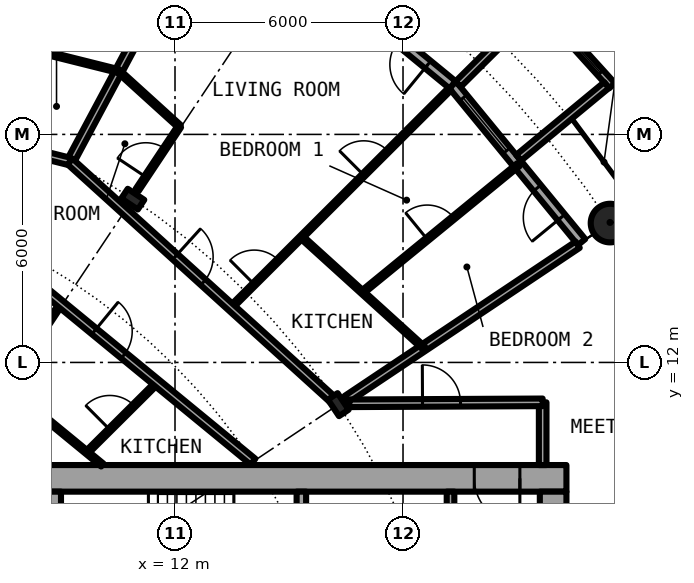
"""IFC4 building model, lengths in metres.
Left out: names, types, materials, properties, quantities, classifications, styles, units other than length and angle.
Written with IfcOpenShell. Run it as: python <this file> out.ifc"""

import sys

from ifc_helpers import new_model, si_unit, direction, frame, frame_2d, origin, origin_2d, place, context, subcontext, project, spatial, rectangle, circle, hollow_circle, i_section, extrude, element, fill, save


model = new_model("IFC4")
c1 = context("Model", 3, precision=1e-05, world=origin(), true_north=direction((0.0, 1.0)))
c2 = subcontext(c1, "Body", "Model", "MODEL_VIEW")
j1 = project(units=[si_unit("LENGTHUNIT", "METRE"), si_unit("PLANEANGLEUNIT", "RADIAN")], contexts=[c1])
p1 = place(None, origin())
s1 = spatial("IfcSite", under=j1, at=p1, CompositionType="ELEMENT")
p2 = place(p1, origin())
s2 = spatial("IfcBuilding", under=s1, at=p2, CompositionType="ELEMENT")
p3 = place(p2, frame((0.0, 0.0, 81.9)))
s3 = spatial("IfcBuildingStorey", under=s2, at=p3, CompositionType="ELEMENT", Elevation=81.9)
p4 = place(p3, frame((23.448, 15.667, 0.0), z_axis=(0.0, 0.0, 1.0), x_axis=(1.0, 0.0, 0.0)))
e1 = element("IfcColumn", 1, at=p4, inside=s3, PredefinedType="COLUMN", context=c2, shape_type="SweptSolid", body=[
    extrude(hollow_circle(Radius=0.508, WallThickness=0.04, at=origin_2d()), origin(), (0.0, 0.0, 1.0), 3.05),
])
for number, where, z_axis, x_axis in (
    (2, (16.297, 10.889, 0.0), (0.0, 0.0, 1.0), (0.831, 0.556, 0.0)),
    (3, (10.889, 16.297, 0.0), (0.0, 0.0, 1.0), (0.556, 0.831, 0.0)),
):
    element("IfcColumn", number, at=place(p3, frame(where, z_axis=z_axis, x_axis=x_axis)), inside=s3, PredefinedType="COLUMN", context=c2, shape_type="SweptSolid", body=[
        extrude(i_section(OverallWidth=0.306, OverallDepth=0.524, WebThickness=0.021, FlangeThickness=0.04, FilletRadius=0.027, at=origin_2d()), origin(), (0.0, 0.0, 1.0), 3.05),
    ])
p5 = place(p3, frame((22.699, 15.167, 0.0), z_axis=(0.0, 0.0, 1.0), x_axis=(-0.634382322723, 0.773019449054, 0.0)))
e4 = element("IfcWall", 4, at=p5, inside=s3, PredefinedType="SOLIDWALL", context=c2, shape_type="SweptSolid", body=[
    extrude(rectangle(XDim=5.352, YDim=0.25, at=frame_2d((2.676, 0.0))), origin(), (0.0, 0.0, 1.0), 2.7),
])
p6 = place(p5, frame((0.841, 0.0, 0.0)))
e5 = element("IfcOpeningElement", 5, at=p6, cuts=e4, PredefinedType="OPENING", context=c2, shape_type="SweptSolid", body=[
    extrude(rectangle(XDim=1.0, YDim=2.2, at=frame_2d((0.5, 1.1))), frame((0.0, 0.135, 0.0), z_axis=(0.0, -1.0, 0.0), x_axis=(1.0, 0.0, 0.0)), (0.0, 0.0, 1.0), 0.27),
])
p7 = place(p5, frame((3.111, 0.0, 0.3)))
e6 = element("IfcOpeningElement", 6, at=p7, cuts=e4, PredefinedType="OPENING", context=c2, shape_type="SweptSolid", body=[
    extrude(rectangle(XDim=1.8, YDim=2.1, at=frame_2d((0.9, 1.05))), frame((0.0, 0.135, 0.0), z_axis=(0.0, -1.0, 0.0), x_axis=(1.0, 0.0, 0.0)), (0.0, 0.0, 1.0), 0.27),
])
p8 = place(p3, frame((23.503, 19.282, -0.03), z_axis=(0.0, 0.0, 1.0), x_axis=(-0.671506829416, 0.740998365753, 0.0)))
e7 = element("IfcWall", 7, at=p8, inside=s3, PredefinedType="SOLIDWALL", context=c2, shape_type="SweptSolid", body=[
    extrude(rectangle(XDim=2.993, YDim=0.2, at=frame_2d((1.497, 0.0))), origin(), (0.0, 0.0, 1.0), 2.73),
])
p9 = place(p8, frame((0.457, 0.0, 0.33)))
e8 = element("IfcOpeningElement", 8, at=p9, cuts=e7, PredefinedType="OPENING", context=c2, shape_type="SweptSolid", body=[
    extrude(circle(Radius=1.04, at=frame_2d((1.04, 1.04))), frame((0.0, 0.11, 0.0), z_axis=(0.0, -1.0, 0.0), x_axis=(1.0, 0.0, 0.0)), (0.0, 0.0, 1.0), 0.22),
])
p10 = place(p3, frame((21.041, 17.384, -0.03), z_axis=(0.0, 0.0, 1.0), x_axis=(0.770784861449, 0.63709551667, 0.0)))
e9 = element("IfcWall", 9, at=p10, inside=s3, PredefinedType="SOLIDWALL", context=c2, shape_type="SweptSolid", body=[
    extrude(rectangle(XDim=3.006, YDim=0.2, at=frame_2d((1.503, 0.0))), origin(), (0.0, 0.0, 1.0), 2.73),
])
p11 = place(p3, frame((19.45, 19.323, -0.03), z_axis=(0.0, 0.0, 1.0), x_axis=(0.709727076896, 0.704476739375, 0.0)))
e10 = element("IfcWall", 10, at=p11, inside=s3, PredefinedType="SOLIDWALL", context=c2, shape_type="SweptSolid", body=[
    extrude(rectangle(XDim=2.883, YDim=0.2, at=frame_2d((1.441, 0.0))), origin(), (0.0, 0.0, 1.0), 2.73),
])
p12 = place(p3, frame((19.304, 19.304, 0.0), z_axis=(0.0, 0.0, 1.0), x_axis=(-0.773019449054, 0.634382322723, 0.0)))
e11 = element("IfcWall", 11, at=p12, inside=s3, PredefinedType="SOLIDWALL", context=c2, shape_type="SweptSolid", body=[
    extrude(rectangle(XDim=5.352, YDim=0.25, at=frame_2d((2.676, 0.0))), origin(), (0.0, 0.0, 1.0), 2.7),
])
p13 = place(p12, frame((0.841, 0.0, 0.0)))
e12 = element("IfcOpeningElement", 12, at=p13, cuts=e11, PredefinedType="OPENING", context=c2, shape_type="SweptSolid", body=[
    extrude(rectangle(XDim=1.0, YDim=2.2, at=frame_2d((0.5, 1.1))), frame((0.0, 0.135, 0.0), z_axis=(0.0, -1.0, 0.0), x_axis=(1.0, 0.0, 0.0)), (0.0, 0.0, 1.0), 0.27),
])
p14 = place(p12, frame((3.111, 0.0, 0.3)))
e13 = element("IfcOpeningElement", 13, at=p14, cuts=e11, PredefinedType="OPENING", context=c2, shape_type="SweptSolid", body=[
    extrude(rectangle(XDim=1.8, YDim=2.1, at=frame_2d((0.9, 1.05))), frame((0.0, 0.135, 0.0), z_axis=(0.0, -1.0, 0.0), x_axis=(1.0, 0.0, 0.0)), (0.0, 0.0, 1.0), 0.27),
])
p15 = place(p3, frame((22.3, 8.95, 0.0), z_axis=(0.0, 0.0, 1.0), x_axis=(-1.0, 0.0, 0.0)))
e14 = element("IfcWall", 14, at=p15, inside=s3, PredefinedType="SHEAR", context=c2, shape_type="SweptSolid", body=[
    extrude(rectangle(XDim=14.0, YDim=0.7, at=frame_2d((7.0, 0.0))), origin(), (0.0, 0.0, 1.0), 3.05),
])
p16 = place(p15, frame((1.225, 0.0, 0.0)))
e15 = element("IfcOpeningElement", 15, at=p16, cuts=e14, PredefinedType="OPENING", context=c2, shape_type="SweptSolid", body=[
    extrude(rectangle(XDim=1.2, YDim=2.3, at=frame_2d((0.6, 1.15))), frame((0.0, 0.36, 0.0), z_axis=(0.0, -1.0, 0.0), x_axis=(1.0, 0.0, 0.0)), (0.0, 0.0, 1.0), 0.72),
])
p17 = place(p3, frame((21.95, 8.6, 0.0), z_axis=(0.0, 0.0, 1.0), x_axis=(0.0, -1.0, 0.0)))
e16 = element("IfcWall", 16, at=p17, inside=s3, PredefinedType="SHEAR", context=c2, shape_type="SweptSolid", body=[
    extrude(rectangle(XDim=17.2, YDim=0.7, at=frame_2d((8.6, 0.0))), origin(), (0.0, 0.0, 1.0), 3.05),
])
p18 = place(p17, frame((7.7, 0.0, 0.0)))
e17 = element("IfcOpeningElement", 17, at=p18, cuts=e16, PredefinedType="OPENING", context=c2, shape_type="SweptSolid", body=[
    extrude(rectangle(XDim=1.8, YDim=2.3, at=frame_2d((0.9, 1.15))), frame((0.0, 0.36, 0.0), z_axis=(0.0, -1.0, 0.0), x_axis=(1.0, 0.0, 0.0)), (0.0, 0.0, 1.0), 0.72),
])
p19 = place(p3, frame((8.65, -8.6, 0.0), z_axis=(0.0, 0.0, 1.0), x_axis=(0.0, 1.0, 0.0)))
e18 = element("IfcWall", 18, at=p19, inside=s3, PredefinedType="SHEAR", context=c2, shape_type="SweptSolid", body=[
    extrude(rectangle(XDim=17.2, YDim=0.7, at=frame_2d((8.6, 0.0))), origin(), (0.0, 0.0, 1.0), 3.05),
])
p20 = place(p19, frame((7.4, 0.0, 0.1)))
e19 = element("IfcOpeningElement", 19, at=p20, cuts=e18, PredefinedType="OPENING", context=c2, shape_type="SweptSolid", body=[
    extrude(rectangle(XDim=2.4, YDim=2.2, at=frame_2d((1.2, 1.1))), frame((0.0, 0.36, 0.0), z_axis=(0.0, -1.0, 0.0), x_axis=(1.0, 0.0, 0.0)), (0.0, 0.0, 1.0), 0.72),
])
p21 = place(p3, frame((15.325, 4.65, 0.0), z_axis=(0.0, 0.0, 1.0), x_axis=(0.0, 1.0, 0.0)))
e20 = element("IfcWall", 20, at=p21, inside=s3, PredefinedType="SHEAR", context=c2, shape_type="SweptSolid", body=[
    extrude(rectangle(XDim=3.95, YDim=0.25, at=frame_2d((1.975, 0.0))), origin(), (0.0, 0.0, 1.0), 3.05),
])
p22 = place(p21, frame((1.375, 0.0, 0.0)))
e21 = element("IfcOpeningElement", 21, at=p22, cuts=e20, PredefinedType="OPENING", context=c2, shape_type="SweptSolid", body=[
    extrude(rectangle(XDim=1.2, YDim=2.3, at=frame_2d((0.6, 1.15))), frame((0.0, 0.135, 0.0), z_axis=(0.0, -1.0, 0.0), x_axis=(1.0, 0.0, 0.0)), (0.0, 0.0, 1.0), 0.27),
])
p23 = place(p3, frame((19.25, 1.575, 0.0), z_axis=(0.0, 0.0, 1.0), x_axis=(0.0, 1.0, 0.0)))
e22 = element("IfcWall", 22, at=p23, inside=s3, PredefinedType="SOLIDWALL", context=c2, shape_type="SweptSolid", body=[
    extrude(rectangle(XDim=7.025, YDim=0.2, at=frame_2d((3.513, 0.0))), origin(), (0.0, 0.0, 1.0), 2.7),
])
p24 = place(p23, frame((4.475, 0.0, 0.0)))
e23 = element("IfcOpeningElement", 23, at=p24, cuts=e22, PredefinedType="OPENING", context=c2, shape_type="SweptSolid", body=[
    extrude(rectangle(XDim=1.1, YDim=2.3, at=frame_2d((0.55, 1.15))), frame((0.0, 0.11, 0.0), z_axis=(0.0, -1.0, 0.0), x_axis=(1.0, 0.0, 0.0)), (0.0, 0.0, 1.0), 0.22),
])
p25 = place(p3, frame((21.675, 9.3, 0.0), z_axis=(0.0, 0.0, 1.0), x_axis=(0.0, 1.0, 0.0)))
e24 = element("IfcWall", 24, at=p25, inside=s3, PredefinedType="PARTITIONING", context=c2, shape_type="SweptSolid", body=[
    extrude(rectangle(XDim=1.65, YDim=0.2, at=frame_2d((0.825, 0.0))), origin(), (0.0, 0.0, 1.0), 2.7),
])
p26 = place(p3, frame((7.558, 11.376, 0.0), z_axis=(0.0, 0.0, 1.0), x_axis=(0.553615197403, 0.83277260594, 0.0)))
e25 = element("IfcWall", 25, at=p26, inside=s3, PredefinedType="PARTITIONING", context=c2, shape_type="SweptSolid", body=[
    extrude(rectangle(XDim=2.597, YDim=0.1, at=frame_2d((1.299, 0.0))), origin(), (0.0, 0.0, 1.0), 2.7),
])
p27 = place(p3, frame((9.244, 17.284, 0.0), z_axis=(0.0, 0.0, 1.0), x_axis=(0.471506520577, 0.881862574925, 0.0)))
e26 = element("IfcWall", 26, at=p27, inside=s3, PredefinedType="PARTITIONING", context=c2, shape_type="SweptSolid", body=[
    extrude(rectangle(XDim=7.574, YDim=0.2, at=frame_2d((3.787, 0.0))), origin(), (0.0, 0.0, 1.0), 2.7),
])
p28 = place(p3, frame((9.683, 9.632, 0.0), z_axis=(0.0, 0.0, 1.0), x_axis=(0.708796844581, 0.705412668665, 0.0)))
e27 = element("IfcWall", 27, at=p28, inside=s3, PredefinedType="PARTITIONING", context=c2, shape_type="SweptSolid", body=[
    extrude(rectangle(XDim=2.597, YDim=0.1, at=frame_2d((1.299, 0.0))), origin(), (0.0, 0.0, 1.0), 2.7),
])
p29 = place(p28, frame((0.849, 0.0, 0.0)))
e28 = element("IfcOpeningElement", 28, at=p29, cuts=e27, PredefinedType="OPENING", context=c2, shape_type="SweptSolid", body=[
    extrude(rectangle(XDim=0.9, YDim=2.3, at=frame_2d((0.45, 1.15))), frame((0.0, 0.06, 0.0), z_axis=(0.0, -1.0, 0.0), x_axis=(1.0, 0.0, 0.0)), (0.0, 0.0, 1.0), 0.12),
])
p30 = place(p3, frame((11.003, 16.536, 0.0), z_axis=(0.0, 0.0, 1.0), x_axis=(0.554112076035, 0.832442074376, 0.0)))
e29 = element("IfcWall", 29, at=p30, inside=s3, PredefinedType="PARTITIONING", context=c2, shape_type="SweptSolid", body=[
    extrude(rectangle(XDim=2.012, YDim=0.1, at=frame_2d((1.006, 0.0))), origin(), (0.0, 0.0, 1.0), 2.7),
])
p31 = place(p30, frame((0.414, 0.0, 0.0)))
e30 = element("IfcOpeningElement", 30, at=p31, cuts=e29, PredefinedType="OPENING", context=c2, shape_type="SweptSolid", body=[
    extrude(rectangle(XDim=0.9, YDim=2.3, at=frame_2d((0.45, 1.15))), frame((0.0, 0.06, 0.0), z_axis=(0.0, -1.0, 0.0), x_axis=(1.0, 0.0, 0.0)), (0.0, 0.0, 1.0), 0.12),
])
p32 = place(p3, frame((13.474, 13.448, 0.0), z_axis=(0.0, 0.0, 1.0), x_axis=(0.707766479207, 0.706446467123, 0.0)))
e31 = element("IfcWall", 31, at=p32, inside=s3, PredefinedType="PARTITIONING", context=c2, shape_type="SweptSolid", body=[
    extrude(rectangle(XDim=8.138, YDim=0.1, at=frame_2d((4.069, 0.0))), origin(), (0.0, 0.0, 1.0), 2.7),
])
p33 = place(p32, frame((0.861, 0.0, 0.0)))
e32 = element("IfcOpeningElement", 32, at=p33, cuts=e31, PredefinedType="OPENING", context=c2, shape_type="SweptSolid", body=[
    extrude(rectangle(XDim=0.9, YDim=2.3, at=frame_2d((0.45, 1.15))), frame((0.0, 0.06, 0.0), z_axis=(0.0, -1.0, 0.0), x_axis=(1.0, 0.0, 0.0)), (0.0, 0.0, 1.0), 0.12),
])
p34 = place(p32, frame((4.931, 0.0, 0.0)))
e33 = element("IfcOpeningElement", 33, at=p34, cuts=e31, PredefinedType="OPENING", context=c2, shape_type="SweptSolid", body=[
    extrude(rectangle(XDim=0.9, YDim=2.3, at=frame_2d((0.45, 1.15))), frame((0.0, 0.06, 0.0), z_axis=(0.0, -1.0, 0.0), x_axis=(1.0, 0.0, 0.0)), (0.0, 0.0, 1.0), 0.12),
])
p35 = place(p3, frame((16.515, 11.034, 0.0), z_axis=(0.0, 0.0, 1.0), x_axis=(0.831382022135, 0.555701298605, 0.0)))
e34 = element("IfcWall", 34, at=p35, inside=s3, PredefinedType="PARTITIONING", context=c2, shape_type="SweptSolid", body=[
    extrude(rectangle(XDim=7.313, YDim=0.2, at=frame_2d((3.657, 0.0))), origin(), (0.0, 0.0, 1.0), 2.7),
])
p36 = place(p3, frame((16.933, 13.848, 0.0), z_axis=(0.0, 0.0, 1.0), x_axis=(0.774219894911, 0.632916704097, 0.0)))
e35 = element("IfcWall", 35, at=p36, inside=s3, PredefinedType="PARTITIONING", context=c2, shape_type="SweptSolid", body=[
    extrude(rectangle(XDim=5.301, YDim=0.1, at=frame_2d((2.65, 0.0))), origin(), (0.0, 0.0, 1.0), 2.7),
])
p37 = place(p36, frame((2.201, 0.0, 0.0)))
e36 = element("IfcOpeningElement", 36, at=p37, cuts=e35, PredefinedType="OPENING", context=c2, shape_type="SweptSolid", body=[
    extrude(rectangle(XDim=0.9, YDim=2.3, at=frame_2d((0.45, 1.15))), frame((0.0, 0.06, 0.0), z_axis=(0.0, -1.0, 0.0), x_axis=(1.0, 0.0, 0.0)), (0.0, 0.0, 1.0), 0.12),
])
p38 = place(p3, frame((16.588, 10.925, 0.0), z_axis=(0.0, 0.0, 1.0), x_axis=(0.999988019025, 0.004895079807, 0.0)))
e37 = element("IfcWall", 37, at=p38, inside=s3, PredefinedType="PARTITIONING", context=c2, shape_type="SweptSolid", body=[
    extrude(rectangle(XDim=5.087, YDim=0.2, at=frame_2d((2.543, 0.0))), origin(), (0.0, 0.0, 1.0), 2.7),
])
p39 = place(p38, frame((1.925, 0.0, 0.0)))
e38 = element("IfcOpeningElement", 38, at=p39, cuts=e37, PredefinedType="OPENING", context=c2, shape_type="SweptSolid", body=[
    extrude(rectangle(XDim=1.0, YDim=2.3, at=frame_2d((0.5, 1.15))), frame((0.0, 0.11, 0.0), z_axis=(0.0, -1.0, 0.0), x_axis=(1.0, 0.0, 0.0)), (0.0, 0.0, 1.0), 0.22),
])
p40 = place(p3, frame((8.614, 10.509, 0.0), z_axis=(0.0, 0.0, 1.0), x_axis=(0.772957368531, -0.6344579627, 0.0)))
e39 = element("IfcWall", 39, at=p40, inside=s3, PredefinedType="PARTITIONING", context=c2, shape_type="SweptSolid", body=[
    extrude(rectangle(XDim=1.906, YDim=0.1, at=frame_2d((0.953, 0.0))), origin(), (0.0, 0.0, 1.0), 2.7),
])
p41 = place(p3, frame((6.47, 15.613, 0.0), z_axis=(0.0, 0.0, 1.0), x_axis=(0.77292501819, -0.634497372931, 0.0)))
e40 = element("IfcWall", 40, at=p41, inside=s3, PredefinedType="PARTITIONING", context=c2, shape_type="SweptSolid", body=[
    extrude(rectangle(XDim=9.81, YDim=0.2, at=frame_2d((4.905, 0.0))), origin(), (0.0, 0.0, 1.0), 2.7),
])
p42 = place(p41, frame((4.404, 0.0, 0.0)))
e41 = element("IfcOpeningElement", 41, at=p42, cuts=e40, PredefinedType="OPENING", context=c2, shape_type="SweptSolid", body=[
    extrude(rectangle(XDim=1.0, YDim=2.3, at=frame_2d((0.5, 1.15))), frame((0.0, 0.11, 0.0), z_axis=(0.0, -1.0, 0.0), x_axis=(1.0, 0.0, 0.0)), (0.0, 0.0, 1.0), 0.22),
])
p43 = place(p3, frame((0.0, 19.6, 0.0), z_axis=(0.0, 0.0, 1.0), x_axis=(0.970008158324, -0.243072361213, 0.0)))
e42 = element("IfcWall", 42, at=p43, inside=s3, PredefinedType="PARTITIONING", context=c2, shape_type="SweptSolid", body=[
    extrude(rectangle(XDim=9.525, YDim=0.2, at=frame_2d((4.762, 0.0))), origin(), (0.0, 0.0, 1.0), 2.38),
])
p44 = place(p43, frame((5.213, 0.0, 0.0)))
e43 = element("IfcOpeningElement", 43, at=p44, cuts=e42, PredefinedType="OPENING", context=c2, shape_type="SweptSolid", body=[
    extrude(rectangle(XDim=1.0, YDim=2.3, at=frame_2d((0.5, 1.15))), frame((0.0, 0.11, 0.0), z_axis=(0.0, -1.0, 0.0), x_axis=(1.0, 0.0, 0.0)), (0.0, 0.0, 1.0), 0.22),
])
p45 = place(p3, frame((9.239, 17.286, 0.0), z_axis=(0.0, 0.0, 1.0), x_axis=(0.740909940942, -0.671604392044, 0.0)))
e44 = element("IfcWall", 44, at=p45, inside=s3, PredefinedType="PARTITIONING", context=c2, shape_type="SweptSolid", body=[
    extrude(rectangle(XDim=9.367, YDim=0.2, at=frame_2d((4.683, 0.0))), origin(), (0.0, 0.0, 1.0), 2.38),
])
p46 = place(p45, frame((3.731, 0.0, 0.0)))
e45 = element("IfcOpeningElement", 45, at=p46, cuts=e44, PredefinedType="OPENING", context=c2, shape_type="SweptSolid", body=[
    extrude(rectangle(XDim=1.0, YDim=2.3, at=frame_2d((0.5, 1.15))), frame((0.0, 0.11, 0.0), z_axis=(0.0, -1.0, 0.0), x_axis=(1.0, 0.0, 0.0)), (0.0, 0.0, 1.0), 0.22),
])
p47 = place(p3, frame((8.41, 20.193, 0.0), z_axis=(0.0, 0.0, 1.0), x_axis=(0.970076188308, -0.242800718444, 0.0)))
e46 = element("IfcWall", 46, at=p47, inside=s3, PredefinedType="PARTITIONING", context=c2, shape_type="SweptSolid", body=[
    extrude(rectangle(XDim=2.167, YDim=0.1, at=frame_2d((1.083, 0.0))), origin(), (0.0, 0.0, 1.0), 2.7),
])
p48 = place(p3, frame((10.512, 19.667, 0.0), z_axis=(0.0, 0.0, 1.0), x_axis=(0.740836325503, -0.671685595212, 0.0)))
e47 = element("IfcWall", 47, at=p48, inside=s3, PredefinedType="PARTITIONING", context=c2, shape_type="SweptSolid", body=[
    extrude(rectangle(XDim=2.168, YDim=0.1, at=frame_2d((1.084, 0.0))), origin(), (0.0, 0.0, 1.0), 2.7),
])
p49 = place(p3, frame((15.332, 15.297, 0.0), z_axis=(0.0, 0.0, 1.0), x_axis=(0.740836325503, -0.671685595212, 0.0)))
e48 = element("IfcWall", 48, at=p49, inside=s3, PredefinedType="PARTITIONING", context=c2, shape_type="SweptSolid", body=[
    extrude(rectangle(XDim=4.335, YDim=0.1, at=frame_2d((2.168, 0.0))), origin(), (0.0, 0.0, 1.0), 2.7),
])
p50 = place(p6, origin())
e49 = element("IfcDoor", 49, at=p50, inside=s3, OperationType="SINGLE_SWING_LEFT", PredefinedType="DOOR", context=c2, shape_type="SweptSolid", body=[
    extrude(rectangle(XDim=1.0, YDim=2.2, at=frame_2d((0.5, 1.1))), frame((0.0, 0.025, 0.0), z_axis=(0.0, -1.0, 0.0), x_axis=(1.0, 0.0, 0.0)), (0.0, 0.0, 1.0), 0.05),
])
fill(e5, e49)
p51 = place(p7, origin())
e50 = element("IfcWindow", 50, at=p51, inside=s3, PartitioningType="SINGLE_PANEL", PredefinedType="WINDOW", context=c2, shape_type="SweptSolid", body=[
    extrude(rectangle(XDim=1.8, YDim=2.1, at=frame_2d((0.9, 1.05))), frame((0.0, 0.03, 0.0), z_axis=(0.0, -1.0, 0.0), x_axis=(1.0, 0.0, 0.0)), (0.0, 0.0, 1.0), 0.06),
])
fill(e6, e50)
p52 = place(p9, origin())
e51 = element("IfcWindow", 51, at=p52, inside=s3, PartitioningType="SINGLE_PANEL", PredefinedType="WINDOW", context=c2, shape_type="SweptSolid", body=[
    extrude(circle(Radius=1.04, at=frame_2d((1.04, 1.04))), frame((0.0, 0.03, 0.0), z_axis=(0.0, -1.0, 0.0), x_axis=(1.0, 0.0, 0.0)), (0.0, 0.0, 1.0), 0.06),
])
fill(e8, e51)
p53 = place(p13, origin())
e52 = element("IfcDoor", 52, at=p53, inside=s3, OperationType="SINGLE_SWING_LEFT", PredefinedType="DOOR", context=c2, shape_type="SweptSolid", body=[
    extrude(rectangle(XDim=1.0, YDim=2.2, at=frame_2d((0.5, 1.1))), frame((0.0, 0.025, 0.0), z_axis=(0.0, -1.0, 0.0), x_axis=(1.0, 0.0, 0.0)), (0.0, 0.0, 1.0), 0.05),
])
fill(e12, e52)
p54 = place(p16, origin())
e53 = element("IfcDoor", 53, at=p54, inside=s3, OperationType="SINGLE_SWING_RIGHT", PredefinedType="DOOR", context=c2, shape_type="SweptSolid", body=[
    extrude(rectangle(XDim=1.2, YDim=2.3, at=frame_2d((0.6, 1.15))), frame((0.0, 0.025, 0.0), z_axis=(0.0, -1.0, 0.0), x_axis=(1.0, 0.0, 0.0)), (0.0, 0.0, 1.0), 0.05),
])
fill(e15, e53)
p55 = place(p46, origin())
e54 = element("IfcDoor", 54, at=p55, inside=s3, OperationType="SINGLE_SWING_LEFT", PredefinedType="DOOR", context=c2, shape_type="SweptSolid", body=[
    extrude(rectangle(XDim=1.0, YDim=2.3, at=frame_2d((0.5, 1.15))), frame((0.0, 0.025, 0.0), z_axis=(0.0, -1.0, 0.0), x_axis=(1.0, 0.0, 0.0)), (0.0, 0.0, 1.0), 0.05),
])
fill(e45, e54)
p56 = place(p31, origin())
e55 = element("IfcDoor", 55, at=p56, inside=s3, OperationType="SINGLE_SWING_LEFT", PredefinedType="DOOR", context=c2, shape_type="SweptSolid", body=[
    extrude(rectangle(XDim=0.9, YDim=2.3, at=frame_2d((0.45, 1.15))), frame((0.0, 0.025, 0.0), z_axis=(0.0, -1.0, 0.0), x_axis=(1.0, 0.0, 0.0)), (0.0, 0.0, 1.0), 0.05),
])
fill(e30, e55)
p57 = place(p33, origin())
e56 = element("IfcDoor", 56, at=p57, inside=s3, OperationType="SINGLE_SWING_LEFT", PredefinedType="DOOR", context=c2, shape_type="SweptSolid", body=[
    extrude(rectangle(XDim=0.9, YDim=2.3, at=frame_2d((0.45, 1.15))), frame((0.0, 0.025, 0.0), z_axis=(0.0, -1.0, 0.0), x_axis=(1.0, 0.0, 0.0)), (0.0, 0.0, 1.0), 0.05),
])
fill(e32, e56)
p58 = place(p34, origin())
e57 = element("IfcDoor", 57, at=p58, inside=s3, OperationType="SINGLE_SWING_RIGHT", PredefinedType="DOOR", context=c2, shape_type="SweptSolid", body=[
    extrude(rectangle(XDim=0.9, YDim=2.3, at=frame_2d((0.45, 1.15))), frame((0.0, 0.025, 0.0), z_axis=(0.0, -1.0, 0.0), x_axis=(1.0, 0.0, 0.0)), (0.0, 0.0, 1.0), 0.05),
])
fill(e33, e57)
p59 = place(p37, origin())
e58 = element("IfcDoor", 58, at=p59, inside=s3, OperationType="SINGLE_SWING_RIGHT", PredefinedType="DOOR", context=c2, shape_type="SweptSolid", body=[
    extrude(rectangle(XDim=0.9, YDim=2.3, at=frame_2d((0.45, 1.15))), frame((0.0, 0.025, 0.0), z_axis=(0.0, -1.0, 0.0), x_axis=(1.0, 0.0, 0.0)), (0.0, 0.0, 1.0), 0.05),
])
fill(e36, e58)
p60 = place(p42, origin())
e59 = element("IfcDoor", 59, at=p60, inside=s3, OperationType="SINGLE_SWING_LEFT", PredefinedType="DOOR", context=c2, shape_type="SweptSolid", body=[
    extrude(rectangle(XDim=1.0, YDim=2.3, at=frame_2d((0.5, 1.15))), frame((0.0, 0.025, 0.0), z_axis=(0.0, -1.0, 0.0), x_axis=(1.0, 0.0, 0.0)), (0.0, 0.0, 1.0), 0.05),
])
fill(e41, e59)
p61 = place(p29, origin())
e60 = element("IfcDoor", 60, at=p61, inside=s3, OperationType="SINGLE_SWING_LEFT", PredefinedType="DOOR", context=c2, shape_type="SweptSolid", body=[
    extrude(rectangle(XDim=0.9, YDim=2.3, at=frame_2d((0.45, 1.15))), frame((0.0, 0.025, 0.0), z_axis=(0.0, -1.0, 0.0), x_axis=(1.0, 0.0, 0.0)), (0.0, 0.0, 1.0), 0.05),
])
fill(e28, e60)
p62 = place(p39, origin())
e61 = element("IfcDoor", 61, at=p62, inside=s3, OperationType="SINGLE_SWING_LEFT", PredefinedType="DOOR", context=c2, shape_type="SweptSolid", body=[
    extrude(rectangle(XDim=1.0, YDim=2.3, at=frame_2d((0.5, 1.15))), frame((0.0, 0.025, 0.0), z_axis=(0.0, -1.0, 0.0), x_axis=(1.0, 0.0, 0.0)), (0.0, 0.0, 1.0), 0.05),
])
fill(e38, e61)
save(model, sys.argv[1])
